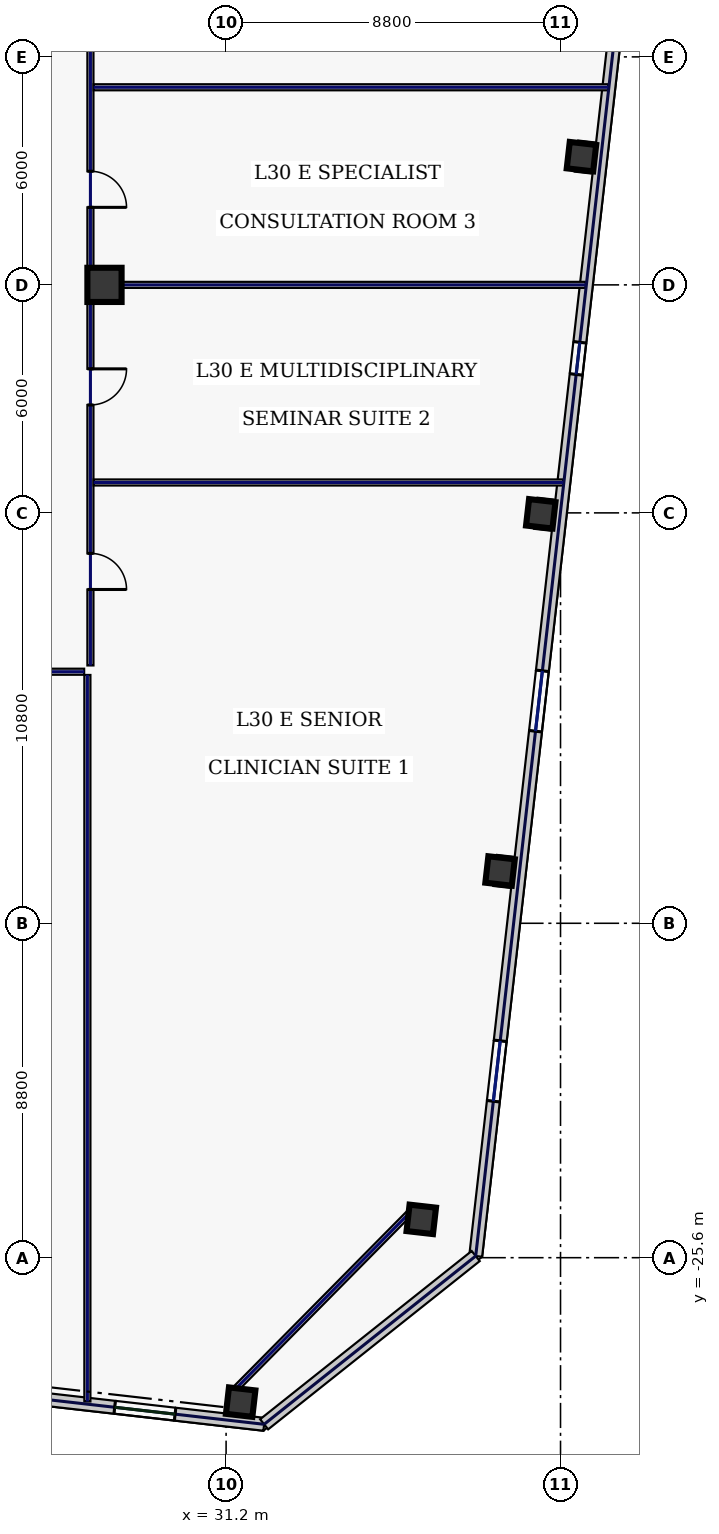
"""IFC4 building model, lengths in metres.
Left out: names, types, materials, properties, quantities, classifications, styles, units other than length and angle.
Written with IfcOpenShell. Run it as: python <this file> out.ifc"""

import sys

from ifc_helpers import new_model, si_unit, direction, frame, frame_2d, origin, origin_2d, place, context, subcontext, project, spatial, rectangle, hollow_rectangle, extrude, element, fill, save


model = new_model("IFC4")
c1 = context("Model", 3, precision=1e-05, world=origin(), true_north=direction((0.0, 1.0)))
c2 = subcontext(c1, "Body", "Model", "MODEL_VIEW")
j1 = project(units=[si_unit("LENGTHUNIT", "METRE"), si_unit("PLANEANGLEUNIT", "RADIAN")], contexts=[c1])
p1 = place(None, origin())
s1 = spatial("IfcSite", under=j1, at=p1, CompositionType="ELEMENT")
p2 = place(p1, origin())
s2 = spatial("IfcBuilding", under=s1, at=p2, CompositionType="ELEMENT")
p3 = place(p2, frame((0.0, 0.0, 133.4)))
s3 = spatial("IfcBuildingStorey", under=s2, at=p3, CompositionType="ELEMENT", Elevation=133.4)
p4 = place(p3, frame((28.0, 0.0, 0.0), z_axis=(0.0, 0.0, 1.0), x_axis=(1.0, 0.0, 0.0)))
e1 = element("IfcColumn", 1, at=p4, inside=s3, PredefinedType="COLUMN", context=c2, shape_type="SweptSolid", body=[
    extrude(hollow_rectangle(XDim=0.9, YDim=0.9, WallThickness=0.04, at=origin_2d()), origin(), (0.0, 0.0, 1.0), 3.74),
])
for number, where, z_axis, x_axis in (
    (2, (31.583, -29.401, 0.0), (0.0, 0.0, 1.0), (0.994, -0.113, 0.0)),
    (3, (36.336, -24.592, 0.0), (0.0, 0.0, 1.0), (0.994, -0.113, 0.0)),
    (4, (38.409, -15.424, 0.0), (0.0, 0.0, 1.0), (0.994, -0.113, 0.0)),
    (5, (39.48, -6.025, 0.0), (0.0, 0.0, 1.0), (0.994, -0.113, 0.0)),
    (6, (40.551, 3.375, 0.0), (0.0, 0.0, 1.0), (0.994, -0.113, 0.0)),
):
    element("IfcColumn", number, at=place(p3, frame(where, z_axis=z_axis, x_axis=x_axis)), inside=s3, PredefinedType="COLUMN", context=c2, shape_type="SweptSolid", body=[
        extrude(hollow_rectangle(XDim=0.7, YDim=0.7, WallThickness=0.032, at=origin_2d()), origin(), (0.0, 0.0, 1.0), 3.74),
    ])
p5 = place(p3, frame((11.115, -27.582, 0.0), z_axis=(0.0, 0.0, 1.0), x_axis=(0.993572655904, -0.113196190044, 0.0)))
e7 = element("IfcWall", 7, at=p5, inside=s3, PredefinedType="STANDARD", context=c2, shape_type="SweptSolid", body=[
    extrude(rectangle(XDim=21.223, YDim=0.34, at=frame_2d((10.611, 0.0))), origin(), (0.0, 0.0, 1.0), 3.74),
])
p6 = place(p5, frame((3.616, 0.0, 0.67)))
e8 = element("IfcOpeningElement", 8, at=p6, cuts=e7, PredefinedType="OPENING", context=c2, shape_type="SweptSolid", body=[
    extrude(rectangle(XDim=2.1, YDim=2.2, at=frame_2d((1.05, 1.1))), frame((0.0, 0.18, 0.0), z_axis=(0.0, -1.0, 0.0), x_axis=(1.0, 0.0, 0.0)), (0.0, 0.0, 1.0), 0.36),
])
p7 = place(p5, frame((7.838, 0.0, 0.67)))
e9 = element("IfcOpeningElement", 9, at=p7, cuts=e7, PredefinedType="OPENING", context=c2, shape_type="SweptSolid", body=[
    extrude(rectangle(XDim=2.1, YDim=2.2, at=frame_2d((1.05, 1.1))), frame((0.0, 0.18, 0.0), z_axis=(0.0, -1.0, 0.0), x_axis=(1.0, 0.0, 0.0)), (0.0, 0.0, 1.0), 0.36),
])
p8 = place(p5, frame((12.794, 0.0, 0.67)))
e10 = element("IfcOpeningElement", 10, at=p8, cuts=e7, PredefinedType="OPENING", context=c2, shape_type="SweptSolid", body=[
    extrude(rectangle(XDim=2.1, YDim=2.2, at=frame_2d((1.05, 1.1))), frame((0.0, 0.18, 0.0), z_axis=(0.0, -1.0, 0.0), x_axis=(1.0, 0.0, 0.0)), (0.0, 0.0, 1.0), 0.36),
])
p9 = place(p5, frame((17.265, 0.0, 0.22)))
e11 = element("IfcOpeningElement", 11, at=p9, cuts=e7, PredefinedType="OPENING", context=c2, shape_type="SweptSolid", body=[
    extrude(rectangle(XDim=1.6, YDim=1.2, at=frame_2d((0.8, 0.6))), frame((0.0, 0.18, 0.0), z_axis=(0.0, -1.0, 0.0), x_axis=(1.0, 0.0, 0.0)), (0.0, 0.0, 1.0), 0.36),
])
p10 = place(p3, frame((37.768, -25.556, 0.0), z_axis=(0.0, 0.0, 1.0), x_axis=(0.113201605824, 0.993572038877, 0.0)))
e12 = element("IfcWall", 12, at=p10, inside=s3, PredefinedType="STANDARD", context=c2, shape_type="SweptSolid", body=[
    extrude(rectangle(XDim=39.2, YDim=0.34, at=frame_2d((19.6, 0.0))), origin(), (0.0, 0.0, 1.0), 3.74),
])
p11 = place(p10, frame((4.1, 0.0, 0.58)))
e13 = element("IfcOpeningElement", 13, at=p11, cuts=e12, PredefinedType="OPENING", context=c2, shape_type="SweptSolid", body=[
    extrude(rectangle(XDim=1.6, YDim=2.3, at=frame_2d((0.8, 1.15))), frame((0.0, 0.18, 0.0), z_axis=(0.0, -1.0, 0.0), x_axis=(1.0, 0.0, 0.0)), (0.0, 0.0, 1.0), 0.36),
])
p12 = place(p10, frame((13.9, 0.0, 0.58)))
e14 = element("IfcOpeningElement", 14, at=p12, cuts=e12, PredefinedType="OPENING", context=c2, shape_type="SweptSolid", body=[
    extrude(rectangle(XDim=1.6, YDim=2.3, at=frame_2d((0.8, 1.15))), frame((0.0, 0.18, 0.0), z_axis=(0.0, -1.0, 0.0), x_axis=(1.0, 0.0, 0.0)), (0.0, 0.0, 1.0), 0.36),
])
p13 = place(p10, frame((23.35, 0.0, 0.75)))
e15 = element("IfcOpeningElement", 15, at=p13, cuts=e12, PredefinedType="OPENING", context=c2, shape_type="SweptSolid", body=[
    extrude(rectangle(XDim=0.85, YDim=1.85, at=frame_2d((0.425, 0.925))), frame((0.0, 0.18, 0.0), z_axis=(0.0, -1.0, 0.0), x_axis=(1.0, 0.0, 0.0)), (0.0, 0.0, 1.0), 0.36),
])
p14 = place(p10, frame((33.5, 0.0, 0.58)))
e16 = element("IfcOpeningElement", 16, at=p14, cuts=e12, PredefinedType="OPENING", context=c2, shape_type="SweptSolid", body=[
    extrude(rectangle(XDim=1.6, YDim=2.3, at=frame_2d((0.8, 1.15))), frame((0.0, 0.18, 0.0), z_axis=(0.0, -1.0, 0.0), x_axis=(1.0, 0.0, 0.0)), (0.0, 0.0, 1.0), 0.36),
])
p15 = place(p3, frame((32.201, -29.985, 0.0), z_axis=(0.0, 0.0, 1.0), x_axis=(0.78261359446, 0.622507800567, 0.0)))
e17 = element("IfcWall", 17, at=p15, inside=s3, PredefinedType="STANDARD", context=c2, shape_type="SweptSolid", body=[
    extrude(rectangle(XDim=7.114, YDim=0.34, at=frame_2d((3.557, 0.0))), origin(), (0.0, 0.0, 1.0), 3.74),
])
p16 = place(p3, frame((31.341, -29.162, 0.0), z_axis=(0.0, 0.0, 1.0), x_axis=(0.702905898933, 0.711282853192, 0.0)))
e18 = element("IfcWall", 18, at=p16, inside=s3, PredefinedType="PARTITIONING", context=c2, shape_type="SweptSolid", body=[
    extrude(rectangle(XDim=6.761, YDim=0.16, at=frame_2d((3.381, 0.0))), origin(), (0.0, 0.0, 1.0), 3.74),
])
p17 = place(p3, frame((27.63, 10.115, 0.0), z_axis=(0.0, 0.0, 1.0), x_axis=(0.0, -1.0, 0.0)))
e19 = element("IfcWall", 19, at=p17, inside=s3, PredefinedType="PARTITIONING", context=c2, shape_type="SweptSolid", body=[
    extrude(rectangle(XDim=20.13, YDim=0.16, at=frame_2d((10.065, 0.0))), origin(), (0.0, 0.0, 1.0), 3.74),
])
p18 = place(p17, frame((17.181, 0.0, 0.0)))
e20 = element("IfcOpeningElement", 20, at=p18, cuts=e19, PredefinedType="OPENING", context=c2, shape_type="SweptSolid", body=[
    extrude(rectangle(XDim=0.95, YDim=2.2, at=frame_2d((0.475, 1.1))), frame((0.0, 0.09, 0.0), z_axis=(0.0, -1.0, 0.0), x_axis=(1.0, 0.0, 0.0)), (0.0, 0.0, 1.0), 0.18),
])
p19 = place(p17, frame((12.325, 0.0, 0.0)))
e21 = element("IfcOpeningElement", 21, at=p19, cuts=e19, PredefinedType="OPENING", context=c2, shape_type="SweptSolid", body=[
    extrude(rectangle(XDim=0.95, YDim=2.2, at=frame_2d((0.475, 1.1))), frame((0.0, 0.09, 0.0), z_axis=(0.0, -1.0, 0.0), x_axis=(1.0, 0.0, 0.0)), (0.0, 0.0, 1.0), 0.18),
])
p20 = place(p17, frame((7.125, 0.0, 0.0)))
e22 = element("IfcOpeningElement", 22, at=p20, cuts=e19, PredefinedType="OPENING", context=c2, shape_type="SweptSolid", body=[
    extrude(rectangle(XDim=0.95, YDim=2.2, at=frame_2d((0.475, 1.1))), frame((0.0, 0.09, 0.0), z_axis=(0.0, -1.0, 0.0), x_axis=(1.0, 0.0, 0.0)), (0.0, 0.0, 1.0), 0.18),
])
p21 = place(p17, frame((2.219, 0.0, 0.0)))
e23 = element("IfcOpeningElement", 23, at=p21, cuts=e19, PredefinedType="OPENING", context=c2, shape_type="SweptSolid", body=[
    extrude(rectangle(XDim=0.95, YDim=2.2, at=frame_2d((0.475, 1.1))), frame((0.0, 0.09, 0.0), z_axis=(0.0, -1.0, 0.0), x_axis=(1.0, 0.0, 0.0)), (0.0, 0.0, 1.0), 0.18),
])
p22 = place(p3, frame((27.465, -10.18, 0.0), z_axis=(0.0, 0.0, 1.0), x_axis=(-1.0, 0.0, 0.0)))
e24 = element("IfcWall", 24, at=p22, inside=s3, PredefinedType="PARTITIONING", context=c2, shape_type="SweptSolid", body=[
    extrude(rectangle(XDim=54.93, YDim=0.16, at=frame_2d((27.465, 0.0))), origin(), (0.0, 0.0, 1.0), 3.74),
])
p23 = place(p22, frame((52.106, 0.0, 0.0)))
e25 = element("IfcOpeningElement", 25, at=p23, cuts=e24, PredefinedType="OPENING", context=c2, shape_type="SweptSolid", body=[
    extrude(rectangle(XDim=0.95, YDim=2.2, at=frame_2d((0.475, 1.1))), frame((0.0, 0.09, 0.0), z_axis=(0.0, -1.0, 0.0), x_axis=(1.0, 0.0, 0.0)), (0.0, 0.0, 1.0), 0.18),
])
p24 = place(p22, frame((47.05, 0.0, 0.0)))
e26 = element("IfcOpeningElement", 26, at=p24, cuts=e24, PredefinedType="OPENING", context=c2, shape_type="SweptSolid", body=[
    extrude(rectangle(XDim=0.95, YDim=2.2, at=frame_2d((0.475, 1.1))), frame((0.0, 0.09, 0.0), z_axis=(0.0, -1.0, 0.0), x_axis=(1.0, 0.0, 0.0)), (0.0, 0.0, 1.0), 0.18),
])
p25 = place(p22, frame((41.65, 0.0, 0.0)))
e27 = element("IfcOpeningElement", 27, at=p25, cuts=e24, PredefinedType="OPENING", context=c2, shape_type="SweptSolid", body=[
    extrude(rectangle(XDim=0.95, YDim=2.2, at=frame_2d((0.475, 1.1))), frame((0.0, 0.09, 0.0), z_axis=(0.0, -1.0, 0.0), x_axis=(1.0, 0.0, 0.0)), (0.0, 0.0, 1.0), 0.18),
])
p26 = place(p22, frame((35.825, 0.0, 0.0)))
e28 = element("IfcOpeningElement", 28, at=p26, cuts=e24, PredefinedType="OPENING", context=c2, shape_type="SweptSolid", body=[
    extrude(rectangle(XDim=0.95, YDim=2.2, at=frame_2d((0.475, 1.1))), frame((0.0, 0.09, 0.0), z_axis=(0.0, -1.0, 0.0), x_axis=(1.0, 0.0, 0.0)), (0.0, 0.0, 1.0), 0.18),
])
p27 = place(p22, frame((29.575, 0.0, 0.0)))
e29 = element("IfcOpeningElement", 29, at=p27, cuts=e24, PredefinedType="OPENING", context=c2, shape_type="SweptSolid", body=[
    extrude(rectangle(XDim=0.95, YDim=2.2, at=frame_2d((0.475, 1.1))), frame((0.0, 0.09, 0.0), z_axis=(0.0, -1.0, 0.0), x_axis=(1.0, 0.0, 0.0)), (0.0, 0.0, 1.0), 0.18),
])
p28 = place(p22, frame((23.285, 0.0, 0.0)))
e30 = element("IfcOpeningElement", 30, at=p28, cuts=e24, PredefinedType="OPENING", context=c2, shape_type="SweptSolid", body=[
    extrude(rectangle(XDim=0.95, YDim=2.2, at=frame_2d((0.475, 1.1))), frame((0.0, 0.09, 0.0), z_axis=(0.0, -1.0, 0.0), x_axis=(1.0, 0.0, 0.0)), (0.0, 0.0, 1.0), 0.18),
])
p29 = place(p22, frame((16.78, 0.0, 0.0)))
e31 = element("IfcOpeningElement", 31, at=p29, cuts=e24, PredefinedType="OPENING", context=c2, shape_type="SweptSolid", body=[
    extrude(rectangle(XDim=1.3, YDim=2.2, at=frame_2d((0.65, 1.1))), frame((0.0, 0.09, 0.0), z_axis=(0.0, -1.0, 0.0), x_axis=(1.0, 0.0, 0.0)), (0.0, 0.0, 1.0), 0.18),
])
p30 = place(p22, frame((11.23, 0.0, 0.0)))
e32 = element("IfcOpeningElement", 32, at=p30, cuts=e24, PredefinedType="OPENING", context=c2, shape_type="SweptSolid", body=[
    extrude(rectangle(XDim=1.3, YDim=2.2, at=frame_2d((0.65, 1.1))), frame((0.0, 0.09, 0.0), z_axis=(0.0, -1.0, 0.0), x_axis=(1.0, 0.0, 0.0)), (0.0, 0.0, 1.0), 0.18),
])
p31 = place(p22, frame((6.46, 0.0, 0.0)))
e33 = element("IfcOpeningElement", 33, at=p31, cuts=e24, PredefinedType="OPENING", context=c2, shape_type="SweptSolid", body=[
    extrude(rectangle(XDim=1.3, YDim=2.2, at=frame_2d((0.65, 1.1))), frame((0.0, 0.09, 0.0), z_axis=(0.0, -1.0, 0.0), x_axis=(1.0, 0.0, 0.0)), (0.0, 0.0, 1.0), 0.18),
])
p32 = place(p22, frame((2.194, 0.0, 0.0)))
e34 = element("IfcOpeningElement", 34, at=p32, cuts=e24, PredefinedType="OPENING", context=c2, shape_type="SweptSolid", body=[
    extrude(rectangle(XDim=0.95, YDim=2.2, at=frame_2d((0.475, 1.1))), frame((0.0, 0.09, 0.0), z_axis=(0.0, -1.0, 0.0), x_axis=(1.0, 0.0, 0.0)), (0.0, 0.0, 1.0), 0.18),
])
p33 = place(p3, frame((27.55, -29.385, 0.0), z_axis=(0.0, 0.0, 1.0), x_axis=(0.0, 1.0, 0.0)))
e35 = element("IfcWall", 35, at=p33, inside=s3, PredefinedType="PARTITIONING", context=c2, shape_type="SweptSolid", body=[
    extrude(rectangle(XDim=19.12, YDim=0.16, at=frame_2d((9.56, 0.0))), origin(), (0.0, 0.0, 1.0), 3.74),
])
p34 = place(p3, frame((27.715, -5.2, 0.0), z_axis=(0.0, 0.0, 1.0), x_axis=(1.0, 0.0, 0.0)))
e36 = element("IfcWall", 36, at=p34, inside=s3, PredefinedType="PARTITIONING", context=c2, shape_type="SweptSolid", body=[
    extrude(rectangle(XDim=12.352, YDim=0.16, at=frame_2d((6.176, 0.0))), origin(), (0.0, 0.0, 1.0), 3.74),
])
p35 = place(p3, frame((27.715, 0.0, 0.0), z_axis=(0.0, 0.0, 1.0), x_axis=(1.0, 0.0, 0.0)))
e37 = element("IfcWall", 37, at=p35, inside=s3, PredefinedType="PARTITIONING", context=c2, shape_type="SweptSolid", body=[
    extrude(rectangle(XDim=12.945, YDim=0.16, at=frame_2d((6.472, 0.0))), origin(), (0.0, 0.0, 1.0), 3.235),
])
p36 = place(p3, frame((27.715, 5.2, 0.0), z_axis=(0.0, 0.0, 1.0), x_axis=(1.0, 0.0, 0.0)))
e38 = element("IfcWall", 38, at=p36, inside=s3, PredefinedType="PARTITIONING", context=c2, shape_type="SweptSolid", body=[
    extrude(rectangle(XDim=13.537, YDim=0.16, at=frame_2d((6.769, 0.0))), origin(), (0.0, 0.0, 1.0), 3.74),
])
p37 = place(p9, origin())
e39 = element("IfcWindow", 39, at=p37, inside=s3, PartitioningType="SINGLE_PANEL", PredefinedType="WINDOW", context=c2, shape_type="SweptSolid", body=[
    extrude(rectangle(XDim=1.6, YDim=1.2, at=frame_2d((0.8, 0.6))), frame((0.0, 0.03, 0.0), z_axis=(0.0, -1.0, 0.0), x_axis=(1.0, 0.0, 0.0)), (0.0, 0.0, 1.0), 0.06),
])
fill(e11, e39)
p38 = place(p11, origin())
e40 = element("IfcWindow", 40, at=p38, inside=s3, PartitioningType="SINGLE_PANEL", PredefinedType="WINDOW", context=c2, shape_type="SweptSolid", body=[
    extrude(rectangle(XDim=1.6, YDim=2.3, at=frame_2d((0.8, 1.15))), frame((0.0, 0.03, 0.0), z_axis=(0.0, -1.0, 0.0), x_axis=(1.0, 0.0, 0.0)), (0.0, 0.0, 1.0), 0.06),
])
fill(e13, e40)
p39 = place(p12, origin())
e41 = element("IfcWindow", 41, at=p39, inside=s3, PartitioningType="SINGLE_PANEL", PredefinedType="WINDOW", context=c2, shape_type="SweptSolid", body=[
    extrude(rectangle(XDim=1.6, YDim=2.3, at=frame_2d((0.8, 1.15))), frame((0.0, 0.03, 0.0), z_axis=(0.0, -1.0, 0.0), x_axis=(1.0, 0.0, 0.0)), (0.0, 0.0, 1.0), 0.06),
])
fill(e14, e41)
p40 = place(p13, origin())
e42 = element("IfcWindow", 42, at=p40, inside=s3, PartitioningType="SINGLE_PANEL", PredefinedType="WINDOW", context=c2, shape_type="SweptSolid", body=[
    extrude(rectangle(XDim=0.85, YDim=1.85, at=frame_2d((0.425, 0.925))), frame((0.0, 0.03, 0.0), z_axis=(0.0, -1.0, 0.0), x_axis=(1.0, 0.0, 0.0)), (0.0, 0.0, 1.0), 0.06),
])
fill(e15, e42)
p41 = place(p18, origin())
e43 = element("IfcDoor", 43, at=p41, inside=s3, OperationType="SINGLE_SWING_RIGHT", PredefinedType="DOOR", context=c2, shape_type="SweptSolid", body=[
    extrude(rectangle(XDim=0.95, YDim=2.2, at=frame_2d((0.475, 1.1))), frame((0.0, 0.025, 0.0), z_axis=(0.0, -1.0, 0.0), x_axis=(1.0, 0.0, 0.0)), (0.0, 0.0, 1.0), 0.05),
])
fill(e20, e43)
p42 = place(p19, origin())
e44 = element("IfcDoor", 44, at=p42, inside=s3, OperationType="SINGLE_SWING_LEFT", PredefinedType="DOOR", context=c2, shape_type="SweptSolid", body=[
    extrude(rectangle(XDim=0.95, YDim=2.2, at=frame_2d((0.475, 1.1))), frame((0.0, 0.025, 0.0), z_axis=(0.0, -1.0, 0.0), x_axis=(1.0, 0.0, 0.0)), (0.0, 0.0, 1.0), 0.05),
])
fill(e21, e44)
p43 = place(p20, origin())
e45 = element("IfcDoor", 45, at=p43, inside=s3, OperationType="SINGLE_SWING_RIGHT", PredefinedType="DOOR", context=c2, shape_type="SweptSolid", body=[
    extrude(rectangle(XDim=0.95, YDim=2.2, at=frame_2d((0.475, 1.1))), frame((0.0, 0.025, 0.0), z_axis=(0.0, -1.0, 0.0), x_axis=(1.0, 0.0, 0.0)), (0.0, 0.0, 1.0), 0.05),
])
fill(e22, e45)
save(model, sys.argv[1])
